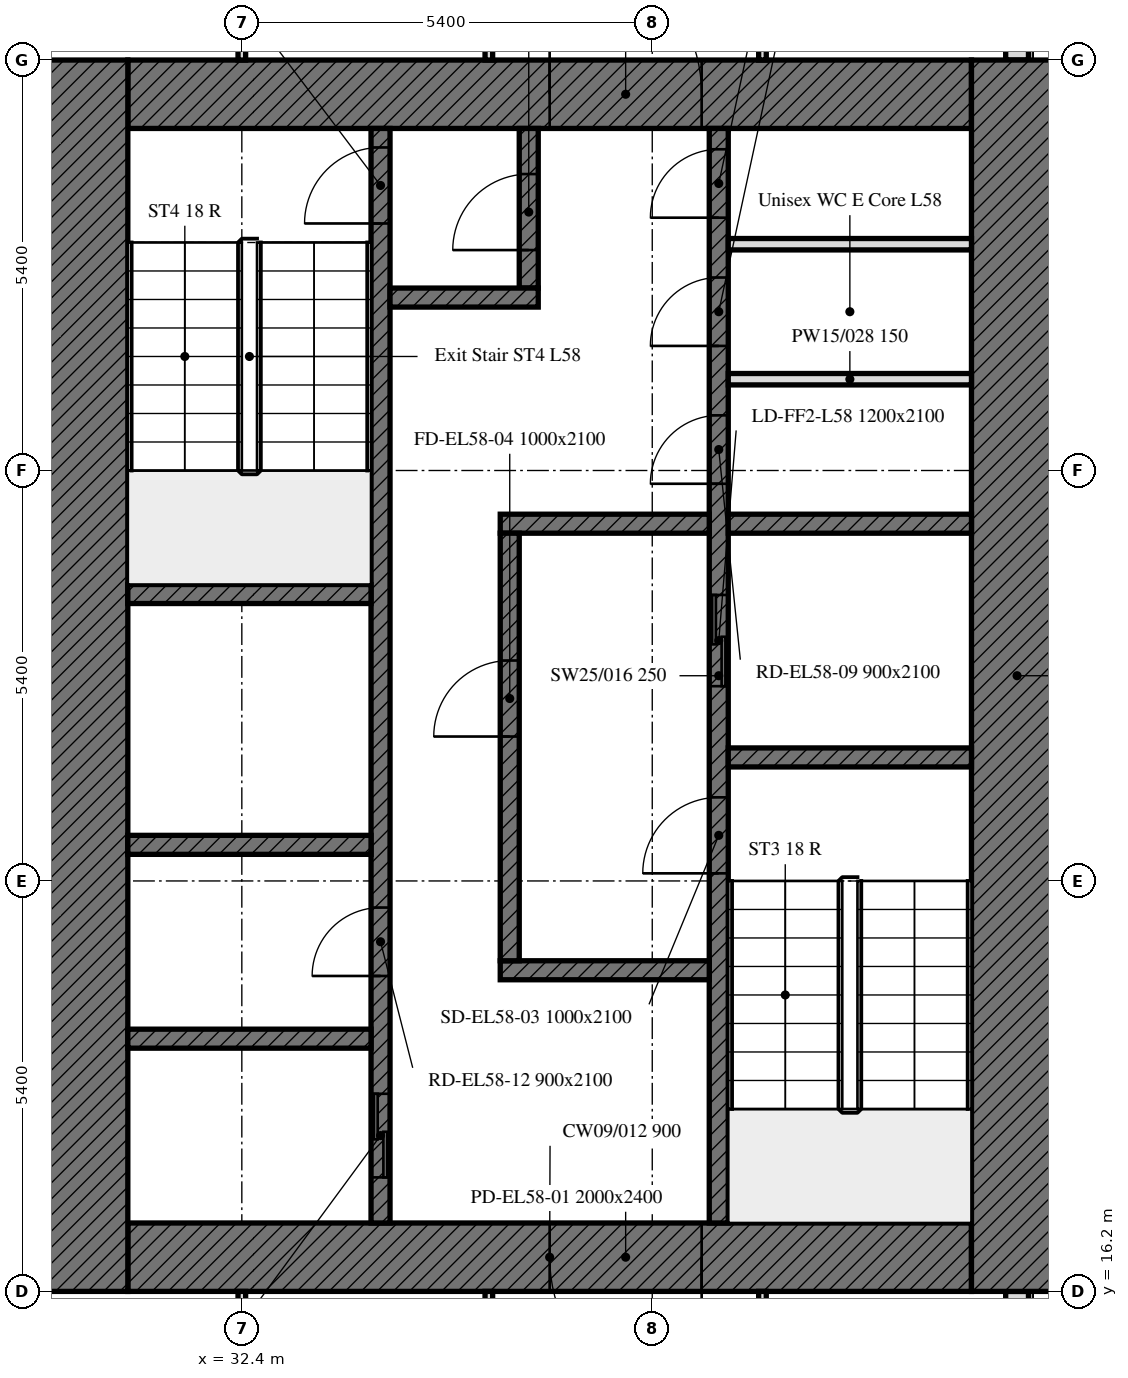
"""IFC4 building model, lengths in metres.
Left out: names, types, materials, properties, quantities, classifications, styles, units other than length and angle.
Written with IfcOpenShell. Run it as: python <this file> out.ifc"""

import sys

from ifc_helpers import new_model, si_unit, direction, frame, frame_2d, origin, place, context, subcontext, project, spatial, rectangle, extrude, element, fill, save


model = new_model("IFC4")
c1 = context("Model", 3, precision=1e-05, world=origin(), true_north=direction((0.0, 1.0)))
c2 = subcontext(c1, "Body", "Model", "MODEL_VIEW")
j1 = project(units=[si_unit("LENGTHUNIT", "METRE"), si_unit("PLANEANGLEUNIT", "RADIAN")], contexts=[c1])
p1 = place(None, origin())
s1 = spatial("IfcSite", under=j1, at=p1, CompositionType="ELEMENT")
p2 = place(p1, origin())
s2 = spatial("IfcBuilding", under=s1, at=p2, CompositionType="ELEMENT")
p3 = place(p2, frame((0.0, 0.0, 230.2)))
s3 = spatial("IfcBuildingStorey", under=s2, at=p3, CompositionType="ELEMENT", Elevation=230.2)
p4 = place(p3, frame((42.6, 10.986, 0.0), z_axis=(0.0, 0.0, 1.0), x_axis=(0.0, 1.0, 0.0)))
e1 = element("IfcWall", 1, at=p4, inside=s3, PredefinedType="SOLIDWALL", context=c2, shape_type="SweptSolid", body=[
    extrude(rectangle(XDim=5.214, YDim=0.3, at=frame_2d((2.607, 0.0))), origin(), (0.0, 0.0, 1.0), 2.8),
])
p5 = place(p4, frame((1.164, 0.0, 0.9)))
e2 = element("IfcOpeningElement", 2, at=p5, cuts=e1, PredefinedType="OPENING", context=c2, shape_type="SweptSolid", body=[
    extrude(rectangle(XDim=1.1, YDim=1.7, at=frame_2d((0.55, 0.85))), frame((0.0, 0.16, 0.0), z_axis=(0.0, -1.0, 0.0), x_axis=(1.0, 0.0, 0.0)), (0.0, 0.0, 1.0), 0.32),
])
p6 = place(p4, frame((2.764, 0.0, 0.9)))
e3 = element("IfcOpeningElement", 3, at=p6, cuts=e1, PredefinedType="OPENING", context=c2, shape_type="SweptSolid", body=[
    extrude(rectangle(XDim=1.1, YDim=1.7, at=frame_2d((0.55, 0.85))), frame((0.0, 0.16, 0.0), z_axis=(0.0, -1.0, 0.0), x_axis=(1.0, 0.0, 0.0)), (0.0, 0.0, 1.0), 0.32),
])
p7 = place(p3, frame((42.6, 32.4, 0.0), z_axis=(0.0, 0.0, 1.0), x_axis=(0.0, 1.0, 0.0)))
e4 = element("IfcWall", 4, at=p7, inside=s3, PredefinedType="SOLIDWALL", context=c2, shape_type="SweptSolid", body=[
    extrude(rectangle(XDim=10.614, YDim=0.3, at=frame_2d((5.307, 0.0))), origin(), (0.0, 0.0, 1.0), 2.8),
])
p8 = place(p7, frame((1.35, 0.0, 0.9)))
e5 = element("IfcOpeningElement", 5, at=p8, cuts=e4, PredefinedType="OPENING", context=c2, shape_type="SweptSolid", body=[
    extrude(rectangle(XDim=1.1, YDim=1.7, at=frame_2d((0.55, 0.85))), frame((0.0, 0.16, 0.0), z_axis=(0.0, -1.0, 0.0), x_axis=(1.0, 0.0, 0.0)), (0.0, 0.0, 1.0), 0.32),
])
p9 = place(p7, frame((2.95, 0.0, 0.9)))
e6 = element("IfcOpeningElement", 6, at=p9, cuts=e4, PredefinedType="OPENING", context=c2, shape_type="SweptSolid", body=[
    extrude(rectangle(XDim=1.1, YDim=1.7, at=frame_2d((0.55, 0.85))), frame((0.0, 0.16, 0.0), z_axis=(0.0, -1.0, 0.0), x_axis=(1.0, 0.0, 0.0)), (0.0, 0.0, 1.0), 0.32),
])
p10 = place(p7, frame((6.75, 0.0, 0.9)))
e7 = element("IfcOpeningElement", 7, at=p10, cuts=e4, PredefinedType="OPENING", context=c2, shape_type="SweptSolid", body=[
    extrude(rectangle(XDim=1.1, YDim=1.7, at=frame_2d((0.55, 0.85))), frame((0.0, 0.16, 0.0), z_axis=(0.0, -1.0, 0.0), x_axis=(1.0, 0.0, 0.0)), (0.0, 0.0, 1.0), 0.32),
])
p11 = place(p7, frame((8.35, 0.0, 0.9)))
e8 = element("IfcOpeningElement", 8, at=p11, cuts=e4, PredefinedType="OPENING", context=c2, shape_type="SweptSolid", body=[
    extrude(rectangle(XDim=1.1, YDim=1.7, at=frame_2d((0.55, 0.85))), frame((0.0, 0.16, 0.0), z_axis=(0.0, -1.0, 0.0), x_axis=(1.0, 0.0, 0.0)), (0.0, 0.0, 1.0), 0.32),
])
p12 = place(p3, frame((42.0, 16.65, 0.0), z_axis=(0.0, 0.0, 1.0), x_axis=(-1.0, 0.0, 0.0)))
e9 = element("IfcWall", 9, at=p12, inside=s3, PredefinedType="SOLIDWALL", context=c2, shape_type="SweptSolid", body=[
    extrude(rectangle(XDim=11.1, YDim=0.9, at=frame_2d((5.55, 0.0))), origin(), (0.0, 0.0, 1.0), 2.8),
])
p13 = place(p12, frame((3.55, 0.0, 0.0)))
e10 = element("IfcOpeningElement", 10, at=p13, cuts=e9, PredefinedType="OPENING", context=c2, shape_type="SweptSolid", body=[
    extrude(rectangle(XDim=2.0, YDim=2.4, at=frame_2d((1.0, 1.2))), frame((0.0, 0.45, 0.0), z_axis=(0.0, -1.0, 0.0), x_axis=(1.0, 0.0, 0.0)), (0.0, 0.0, 1.0), 0.9),
])
p14 = place(p3, frame((30.9, 31.95, 0.0), z_axis=(0.0, 0.0, 1.0), x_axis=(1.0, 0.0, 0.0)))
e11 = element("IfcWall", 11, at=p14, inside=s3, PredefinedType="SOLIDWALL", context=c2, shape_type="SweptSolid", body=[
    extrude(rectangle(XDim=11.1, YDim=0.9, at=frame_2d((5.55, 0.0))), origin(), (0.0, 0.0, 1.0), 2.8),
])
p15 = place(p14, frame((5.55, 0.0, 0.0)))
e12 = element("IfcOpeningElement", 12, at=p15, cuts=e11, PredefinedType="OPENING", context=c2, shape_type="SweptSolid", body=[
    extrude(rectangle(XDim=2.0, YDim=2.4, at=frame_2d((1.0, 1.2))), frame((0.0, 0.45, 0.0), z_axis=(0.0, -1.0, 0.0), x_axis=(1.0, 0.0, 0.0)), (0.0, 0.0, 1.0), 0.9),
])
for number, where, z_axis, x_axis in (
    (13, (42.6, 32.4, 0.0), (0.0, 0.0, 1.0), (0.0, -1.0, 0.0)),
    (14, (30.3, 16.2, 0.0), (0.0, 0.0, 1.0), (0.0, 1.0, 0.0)),
):
    element("IfcWall", number, at=place(p3, frame(where, z_axis=z_axis, x_axis=x_axis)), inside=s3, PredefinedType="SOLIDWALL", context=c2, shape_type="SweptSolid", body=[
        extrude(rectangle(XDim=16.2, YDim=1.2, at=frame_2d((8.1, 0.0))), origin(), (0.0, 0.0, 1.0), 2.8),
    ])
p16 = place(p3, frame((38.675, 17.1, 0.0), z_axis=(0.0, 0.0, 1.0), x_axis=(0.0, 1.0, 0.0)))
e15 = element("IfcWall", 15, at=p16, inside=s3, PredefinedType="SOLIDWALL", context=c2, shape_type="SweptSolid", body=[
    extrude(rectangle(XDim=14.4, YDim=0.25, at=frame_2d((7.2, 0.0))), origin(), (0.0, 0.0, 1.0), 2.8),
])
p17 = place(p16, frame((4.6, 0.0, 0.0)))
e16 = element("IfcOpeningElement", 16, at=p17, cuts=e15, PredefinedType="OPENING", context=c2, shape_type="SweptSolid", body=[
    extrude(rectangle(XDim=1.0, YDim=2.1, at=frame_2d((0.5, 1.05))), frame((0.0, 0.125, 0.0), z_axis=(0.0, -1.0, 0.0), x_axis=(1.0, 0.0, 0.0)), (0.0, 0.0, 1.0), 0.25),
])
p18 = place(p16, frame((7.062, 0.0, 0.0)))
e17 = element("IfcOpeningElement", 17, at=p18, cuts=e15, PredefinedType="OPENING", context=c2, shape_type="SweptSolid", body=[
    extrude(rectangle(XDim=1.2, YDim=2.1, at=frame_2d((0.6, 1.05))), frame((0.0, 0.125, 0.0), z_axis=(0.0, -1.0, 0.0), x_axis=(1.0, 0.0, 0.0)), (0.0, 0.0, 1.0), 0.25),
])
p19 = place(p16, frame((9.726, 0.0, 0.0)))
e18 = element("IfcOpeningElement", 18, at=p19, cuts=e15, PredefinedType="OPENING", context=c2, shape_type="SweptSolid", body=[
    extrude(rectangle(XDim=0.9, YDim=2.1, at=frame_2d((0.45, 1.05))), frame((0.0, 0.125, 0.0), z_axis=(0.0, -1.0, 0.0), x_axis=(1.0, 0.0, 0.0)), (0.0, 0.0, 1.0), 0.25),
])
p20 = place(p16, frame((11.539, 0.0, 0.0)))
e19 = element("IfcOpeningElement", 19, at=p20, cuts=e15, PredefinedType="OPENING", context=c2, shape_type="SweptSolid", body=[
    extrude(rectangle(XDim=0.9, YDim=2.1, at=frame_2d((0.45, 1.05))), frame((0.0, 0.125, 0.0), z_axis=(0.0, -1.0, 0.0), x_axis=(1.0, 0.0, 0.0)), (0.0, 0.0, 1.0), 0.25),
])
p21 = place(p16, frame((13.226, 0.0, 0.0)))
e20 = element("IfcOpeningElement", 20, at=p21, cuts=e15, PredefinedType="OPENING", context=c2, shape_type="SweptSolid", body=[
    extrude(rectangle(XDim=0.9, YDim=2.1, at=frame_2d((0.45, 1.05))), frame((0.0, 0.125, 0.0), z_axis=(0.0, -1.0, 0.0), x_axis=(1.0, 0.0, 0.0)), (0.0, 0.0, 1.0), 0.25),
])
p22 = place(p3, frame((34.225, 17.1, 0.0), z_axis=(0.0, 0.0, 1.0), x_axis=(0.0, 1.0, 0.0)))
e21 = element("IfcWall", 21, at=p22, inside=s3, PredefinedType="SOLIDWALL", context=c2, shape_type="SweptSolid", body=[
    extrude(rectangle(XDim=14.4, YDim=0.25, at=frame_2d((7.2, 0.0))), origin(), (0.0, 0.0, 1.0), 2.8),
])
p23 = place(p22, frame((13.15, 0.0, 0.0)))
e22 = element("IfcOpeningElement", 22, at=p23, cuts=e21, PredefinedType="OPENING", context=c2, shape_type="SweptSolid", body=[
    extrude(rectangle(XDim=1.0, YDim=2.1, at=frame_2d((0.5, 1.05))), frame((0.0, 0.125, 0.0), z_axis=(0.0, -1.0, 0.0), x_axis=(1.0, 0.0, 0.0)), (0.0, 0.0, 1.0), 0.25),
])
p24 = place(p22, frame((0.6, 0.0, 0.0)))
e23 = element("IfcOpeningElement", 23, at=p24, cuts=e21, PredefinedType="OPENING", context=c2, shape_type="SweptSolid", body=[
    extrude(rectangle(XDim=1.1, YDim=2.1, at=frame_2d((0.55, 1.05))), frame((0.0, 0.125, 0.0), z_axis=(0.0, -1.0, 0.0), x_axis=(1.0, 0.0, 0.0)), (0.0, 0.0, 1.0), 0.25),
])
p25 = place(p22, frame((3.25, 0.0, 0.0)))
e24 = element("IfcOpeningElement", 24, at=p25, cuts=e21, PredefinedType="OPENING", context=c2, shape_type="SweptSolid", body=[
    extrude(rectangle(XDim=0.9, YDim=2.1, at=frame_2d((0.45, 1.05))), frame((0.0, 0.125, 0.0), z_axis=(0.0, -1.0, 0.0), x_axis=(1.0, 0.0, 0.0)), (0.0, 0.0, 1.0), 0.25),
])
p26 = place(p3, frame((38.8, 23.225, 0.0), z_axis=(0.0, 0.0, 1.0), x_axis=(1.0, 0.0, 0.0)))
e25 = element("IfcWall", 25, at=p26, inside=s3, PredefinedType="SOLIDWALL", context=c2, shape_type="SweptSolid", body=[
    extrude(rectangle(XDim=3.2, YDim=0.25, at=frame_2d((1.6, 0.0))), origin(), (0.0, 0.0, 1.0), 2.8),
])
for number, where, z_axis, x_axis in (
    (26, (30.9, 25.375, 0.0), (0.0, 0.0, 1.0), (1.0, 0.0, 0.0)),
    (27, (30.9, 22.075, 0.0), (0.0, 0.0, 1.0), (1.0, 0.0, 0.0)),
):
    element("IfcWall", number, at=place(p3, frame(where, z_axis=z_axis, x_axis=x_axis)), inside=s3, PredefinedType="SOLIDWALL", context=c2, shape_type="SweptSolid", body=[
        extrude(rectangle(XDim=3.2, YDim=0.25, at=frame_2d((1.6, 0.0))), origin(), (0.0, 0.0, 1.0), 2.8),
    ])
p27 = place(p3, frame((38.8, 26.3, 0.0), z_axis=(0.0, 0.0, 1.0), x_axis=(1.0, 0.0, 0.0)))
e28 = element("IfcWall", 28, at=p27, inside=s3, PredefinedType="SOLIDWALL", context=c2, shape_type="SweptSolid", body=[
    extrude(rectangle(XDim=3.2, YDim=0.25, at=frame_2d((1.6, 0.0))), origin(), (0.0, 0.0, 1.0), 2.8),
])
for number, where, z_axis, x_axis in (
    (29, (35.8, 26.3, 0.0), (0.0, 0.0, 1.0), (1.0, 0.0, 0.0)),
    (30, (35.8, 20.425, 0.0), (0.0, 0.0, 1.0), (1.0, 0.0, 0.0)),
):
    element("IfcWall", number, at=place(p3, frame(where, z_axis=z_axis, x_axis=x_axis)), inside=s3, PredefinedType="SOLIDWALL", context=c2, shape_type="SweptSolid", body=[
        extrude(rectangle(XDim=2.75, YDim=0.25, at=frame_2d((1.375, 0.0))), origin(), (0.0, 0.0, 1.0), 2.8),
    ])
p28 = place(p3, frame((36.175, 29.4, 0.0), z_axis=(0.0, 0.0, 1.0), x_axis=(0.0, 1.0, 0.0)))
e31 = element("IfcWall", 31, at=p28, inside=s3, PredefinedType="SOLIDWALL", context=c2, shape_type="SweptSolid", body=[
    extrude(rectangle(XDim=2.1, YDim=0.25, at=frame_2d((1.05, 0.0))), origin(), (0.0, 0.0, 1.0), 2.8),
])
p29 = place(p28, frame((0.5, 0.0, 0.0)))
e32 = element("IfcOpeningElement", 32, at=p29, cuts=e31, PredefinedType="OPENING", context=c2, shape_type="SweptSolid", body=[
    extrude(rectangle(XDim=1.0, YDim=2.1, at=frame_2d((0.5, 1.05))), frame((0.0, 0.125, 0.0), z_axis=(0.0, -1.0, 0.0), x_axis=(1.0, 0.0, 0.0)), (0.0, 0.0, 1.0), 0.25),
])
p30 = place(p3, frame((34.35, 29.275, 0.0), z_axis=(0.0, 0.0, 1.0), x_axis=(1.0, 0.0, 0.0)))
e33 = element("IfcWall", 33, at=p30, inside=s3, PredefinedType="SOLIDWALL", context=c2, shape_type="SweptSolid", body=[
    extrude(rectangle(XDim=1.95, YDim=0.25, at=frame_2d((0.975, 0.0))), origin(), (0.0, 0.0, 1.0), 2.8),
])
p31 = place(p3, frame((35.925, 20.55, 0.0), z_axis=(0.0, 0.0, 1.0), x_axis=(0.0, 1.0, 0.0)))
e34 = element("IfcWall", 34, at=p31, inside=s3, PredefinedType="SOLIDWALL", context=c2, shape_type="SweptSolid", body=[
    extrude(rectangle(XDim=5.625, YDim=0.25, at=frame_2d((2.812, 0.0))), origin(), (0.0, 0.0, 1.0), 2.8),
])
p32 = place(p31, frame((2.95, 0.0, 0.0)))
e35 = element("IfcOpeningElement", 35, at=p32, cuts=e34, PredefinedType="OPENING", context=c2, shape_type="SweptSolid", body=[
    extrude(rectangle(XDim=1.0, YDim=2.1, at=frame_2d((0.5, 1.05))), frame((0.0, 0.125, 0.0), z_axis=(0.0, -1.0, 0.0), x_axis=(1.0, 0.0, 0.0)), (0.0, 0.0, 1.0), 0.25),
])
p33 = place(p3, frame((30.9, 19.525, 0.0), z_axis=(0.0, 0.0, 1.0), x_axis=(1.0, 0.0, 0.0)))
e36 = element("IfcWall", 36, at=p33, inside=s3, PredefinedType="SOLIDWALL", context=c2, shape_type="SweptSolid", body=[
    extrude(rectangle(XDim=3.2, YDim=0.25, at=frame_2d((1.6, 0.0))), origin(), (0.0, 0.0, 1.0), 2.8),
])
for number, where, z_axis, x_axis in (
    (37, (38.8, 28.201, 0.0), (0.0, 0.0, 1.0), (1.0, 0.0, 0.0)),
    (38, (38.8, 29.977, 0.0), (0.0, 0.0, 1.0), (1.0, 0.0, 0.0)),
):
    element("IfcWall", number, at=place(p3, frame(where, z_axis=z_axis, x_axis=x_axis)), inside=s3, PredefinedType="PARTITIONING", context=c2, shape_type="SweptSolid", body=[
        extrude(rectangle(XDim=3.2, YDim=0.15, at=frame_2d((1.6, 0.0))), origin(), (0.0, 0.0, 1.0), 2.8),
    ])
p34 = place(p3, frame((32.4, 32.4, 0.0), z_axis=(0.0, 0.0, 1.0), x_axis=(0.0, 1.0, 0.0)))
e39 = element("IfcWall", 39, at=p34, inside=s3, PredefinedType="PARTITIONING", context=c2, shape_type="SweptSolid", body=[
    extrude(rectangle(XDim=5.005, YDim=0.1, at=frame_2d((2.502, 0.0))), origin(), (0.0, 0.0, 1.0), 2.2),
])
for number, where, z_axis, x_axis in (
    (40, (39.25, 32.4, 0.0), (0.0, 0.0, 1.0), (0.0, 1.0, 0.0)),
    (41, (35.65, 40.425, 0.0), (0.0, 0.0, 1.0), (0.0, -1.0, 0.0)),
):
    element("IfcWall", number, at=place(p3, frame(where, z_axis=z_axis, x_axis=x_axis)), inside=s3, PredefinedType="PARTITIONING", context=c2, shape_type="SweptSolid", body=[
        extrude(rectangle(XDim=8.025, YDim=0.1, at=frame_2d((4.013, 0.0))), origin(), (0.0, 0.0, 1.0), 2.8),
    ])
p35 = place(p3, frame((32.4, 13.575, 0.0), z_axis=(0.0, 0.0, 1.0), x_axis=(0.0, 1.0, 0.0)))
e42 = element("IfcWall", 42, at=p35, inside=s3, PredefinedType="PARTITIONING", context=c2, shape_type="SweptSolid", body=[
    extrude(rectangle(XDim=2.625, YDim=0.1, at=frame_2d((1.312, 0.0))), origin(), (0.0, 0.0, 1.0), 2.2),
])
for number, where, z_axis, x_axis in (
    (43, (39.25, 13.575, 0.0), (0.0, 0.0, 1.0), (0.0, 1.0, 0.0)),
    (44, (35.65, 16.2, 0.0), (0.0, 0.0, 1.0), (0.0, -1.0, 0.0)),
):
    element("IfcWall", number, at=place(p3, frame(where, z_axis=z_axis, x_axis=x_axis)), inside=s3, PredefinedType="PARTITIONING", context=c2, shape_type="SweptSolid", body=[
        extrude(rectangle(XDim=2.625, YDim=0.1, at=frame_2d((1.312, 0.0))), origin(), (0.0, 0.0, 1.0), 2.8),
    ])
p36 = place(p13, origin())
e45 = element("IfcDoor", 45, at=p36, inside=s3, OperationType="DOUBLE_DOOR_SINGLE_SWING", PredefinedType="DOOR", context=c2, shape_type="SweptSolid", body=[
    extrude(rectangle(XDim=2.0, YDim=2.4, at=frame_2d((1.0, 1.2))), frame((0.0, 0.025, 0.0), z_axis=(0.0, -1.0, 0.0), x_axis=(1.0, 0.0, 0.0)), (0.0, 0.0, 1.0), 0.05),
])
fill(e10, e45)
p37 = place(p15, origin())
e46 = element("IfcDoor", 46, at=p37, inside=s3, OperationType="DOUBLE_DOOR_SINGLE_SWING", PredefinedType="DOOR", context=c2, shape_type="SweptSolid", body=[
    extrude(rectangle(XDim=2.0, YDim=2.4, at=frame_2d((1.0, 1.2))), frame((0.0, 0.025, 0.0), z_axis=(0.0, -1.0, 0.0), x_axis=(1.0, 0.0, 0.0)), (0.0, 0.0, 1.0), 0.05),
])
fill(e12, e46)
p38 = place(p17, origin())
e47 = element("IfcDoor", 47, at=p38, inside=s3, OperationType="SINGLE_SWING_LEFT", PredefinedType="DOOR", context=c2, shape_type="SweptSolid", body=[
    extrude(rectangle(XDim=1.0, YDim=2.1, at=frame_2d((0.5, 1.05))), frame((0.0, 0.025, 0.0), z_axis=(0.0, -1.0, 0.0), x_axis=(1.0, 0.0, 0.0)), (0.0, 0.0, 1.0), 0.05),
])
fill(e16, e47)
p39 = place(p32, origin())
e48 = element("IfcDoor", 48, at=p39, inside=s3, OperationType="SINGLE_SWING_LEFT", PredefinedType="DOOR", context=c2, shape_type="SweptSolid", body=[
    extrude(rectangle(XDim=1.0, YDim=2.1, at=frame_2d((0.5, 1.05))), frame((0.0, 0.025, 0.0), z_axis=(0.0, -1.0, 0.0), x_axis=(1.0, 0.0, 0.0)), (0.0, 0.0, 1.0), 0.05),
])
fill(e35, e48)
p40 = place(p23, origin())
e49 = element("IfcDoor", 49, at=p40, inside=s3, OperationType="SINGLE_SWING_LEFT", PredefinedType="DOOR", context=c2, shape_type="SweptSolid", body=[
    extrude(rectangle(XDim=1.0, YDim=2.1, at=frame_2d((0.5, 1.05))), frame((0.0, 0.025, 0.0), z_axis=(0.0, -1.0, 0.0), x_axis=(1.0, 0.0, 0.0)), (0.0, 0.0, 1.0), 0.05),
])
fill(e22, e49)
p41 = place(p29, origin())
e50 = element("IfcDoor", 50, at=p41, inside=s3, OperationType="SINGLE_SWING_LEFT", PredefinedType="DOOR", context=c2, shape_type="SweptSolid", body=[
    extrude(rectangle(XDim=1.0, YDim=2.1, at=frame_2d((0.5, 1.05))), frame((0.0, 0.025, 0.0), z_axis=(0.0, -1.0, 0.0), x_axis=(1.0, 0.0, 0.0)), (0.0, 0.0, 1.0), 0.05),
])
fill(e32, e50)
p42 = place(p18, origin())
e51 = element("IfcDoor", 51, at=p42, inside=s3, OperationType="DOUBLE_DOOR_SLIDING", PredefinedType="DOOR", context=c2, shape_type="SweptSolid", body=[
    extrude(rectangle(XDim=1.2, YDim=2.1, at=frame_2d((0.6, 1.05))), frame((0.0, 0.025, 0.0), z_axis=(0.0, -1.0, 0.0), x_axis=(1.0, 0.0, 0.0)), (0.0, 0.0, 1.0), 0.05),
])
fill(e17, e51)
p43 = place(p24, origin())
e52 = element("IfcDoor", 52, at=p43, inside=s3, OperationType="DOUBLE_DOOR_SLIDING", PredefinedType="DOOR", context=c2, shape_type="SweptSolid", body=[
    extrude(rectangle(XDim=1.1, YDim=2.1, at=frame_2d((0.55, 1.05))), frame((0.0, 0.025, 0.0), z_axis=(0.0, -1.0, 0.0), x_axis=(1.0, 0.0, 0.0)), (0.0, 0.0, 1.0), 0.05),
])
fill(e23, e52)
p44 = place(p19, origin())
e53 = element("IfcDoor", 53, at=p44, inside=s3, OperationType="SINGLE_SWING_LEFT", PredefinedType="DOOR", context=c2, shape_type="SweptSolid", body=[
    extrude(rectangle(XDim=0.9, YDim=2.1, at=frame_2d((0.45, 1.05))), frame((0.0, 0.025, 0.0), z_axis=(0.0, -1.0, 0.0), x_axis=(1.0, 0.0, 0.0)), (0.0, 0.0, 1.0), 0.05),
])
fill(e18, e53)
p45 = place(p20, origin())
e54 = element("IfcDoor", 54, at=p45, inside=s3, OperationType="SINGLE_SWING_LEFT", PredefinedType="DOOR", context=c2, shape_type="SweptSolid", body=[
    extrude(rectangle(XDim=0.9, YDim=2.1, at=frame_2d((0.45, 1.05))), frame((0.0, 0.025, 0.0), z_axis=(0.0, -1.0, 0.0), x_axis=(1.0, 0.0, 0.0)), (0.0, 0.0, 1.0), 0.05),
])
fill(e19, e54)
p46 = place(p21, origin())
e55 = element("IfcDoor", 55, at=p46, inside=s3, OperationType="SINGLE_SWING_LEFT", PredefinedType="DOOR", context=c2, shape_type="SweptSolid", body=[
    extrude(rectangle(XDim=0.9, YDim=2.1, at=frame_2d((0.45, 1.05))), frame((0.0, 0.025, 0.0), z_axis=(0.0, -1.0, 0.0), x_axis=(1.0, 0.0, 0.0)), (0.0, 0.0, 1.0), 0.05),
])
fill(e20, e55)
p47 = place(p25, origin())
e56 = element("IfcDoor", 56, at=p47, inside=s3, OperationType="SINGLE_SWING_LEFT", PredefinedType="DOOR", context=c2, shape_type="SweptSolid", body=[
    extrude(rectangle(XDim=0.9, YDim=2.1, at=frame_2d((0.45, 1.05))), frame((0.0, 0.025, 0.0), z_axis=(0.0, -1.0, 0.0), x_axis=(1.0, 0.0, 0.0)), (0.0, 0.0, 1.0), 0.05),
])
fill(e24, e56)
save(model, sys.argv[1])
